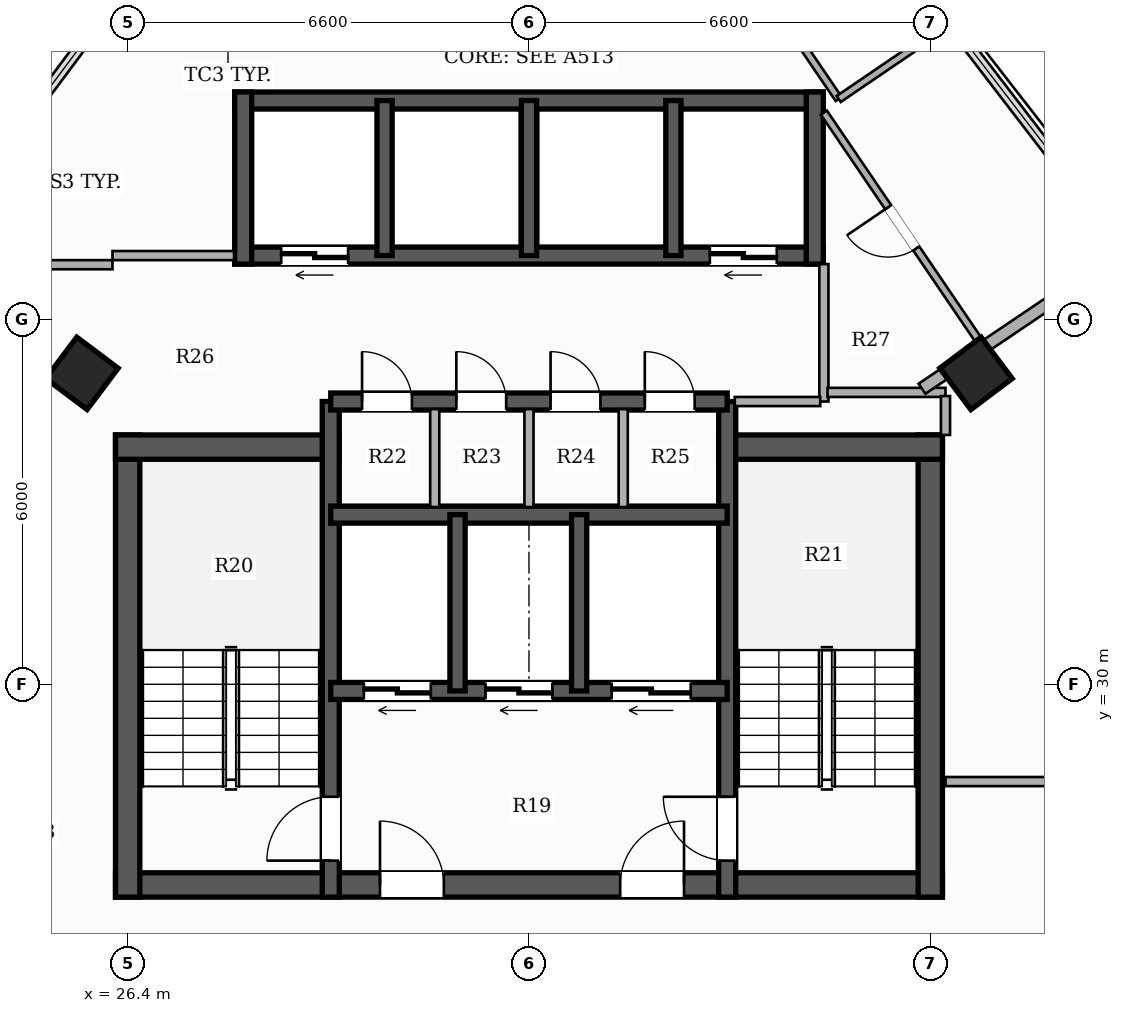
"""IFC4 building model, lengths in metres.
Left out: names, types, materials, properties, quantities, classifications, styles, units other than length and angle.
Written with IfcOpenShell. Run it as: python <this file> out.ifc"""

import sys

from ifc_helpers import new_model, si_unit, direction, frame, frame_2d, origin, origin_2d, place, context, subcontext, project, spatial, rectangle, hollow_rectangle, extrude, element, fill, save


model = new_model("IFC4")
c1 = context("Model", 3, precision=1e-05, world=origin(), true_north=direction((0.0, 1.0)))
c2 = subcontext(c1, "Body", "Model", "MODEL_VIEW")
j1 = project(units=[si_unit("LENGTHUNIT", "METRE"), si_unit("PLANEANGLEUNIT", "RADIAN")], contexts=[c1])
p1 = place(None, origin())
s1 = spatial("IfcSite", under=j1, at=p1, CompositionType="ELEMENT")
p2 = place(p1, origin())
s2 = spatial("IfcBuilding", under=s1, at=p2, CompositionType="ELEMENT")
p3 = place(p2, frame((0.0, 0.0, 160.55)))
s3 = spatial("IfcBuildingStorey", under=s2, at=p3, CompositionType="ELEMENT", Elevation=160.55)
p4 = place(p3, frame((26.2, 26.7, 0.0), z_axis=(0.0, 0.0, 1.0), x_axis=(1.0, 0.0, 0.0)))
e1 = element("IfcWall", 1, at=p4, inside=s3, PredefinedType="SHEAR", context=c2, shape_type="SweptSolid", body=[
    extrude(rectangle(XDim=13.6, YDim=0.4, at=frame_2d((6.8, 0.0))), origin(), (0.0, 0.0, 1.0), 3.3),
])
p5 = place(p4, frame((4.35, 0.0, 0.0)))
e2 = element("IfcOpeningElement", 2, at=p5, cuts=e1, PredefinedType="OPENING", context=c2, shape_type="SweptSolid", body=[
    extrude(rectangle(XDim=1.05, YDim=2.15, at=frame_2d((0.525, 1.075))), frame((0.0, 0.21, 0.0), z_axis=(0.0, -1.0, 0.0), x_axis=(1.0, 0.0, 0.0)), (0.0, 0.0, 1.0), 0.42),
])
p6 = place(p4, frame((8.3, 0.0, 0.0)))
e3 = element("IfcOpeningElement", 3, at=p6, cuts=e1, PredefinedType="OPENING", context=c2, shape_type="SweptSolid", body=[
    extrude(rectangle(XDim=1.05, YDim=2.15, at=frame_2d((0.525, 1.075))), frame((0.0, 0.21, 0.0), z_axis=(0.0, -1.0, 0.0), x_axis=(1.0, 0.0, 0.0)), (0.0, 0.0, 1.0), 0.42),
])
p7 = place(p3, frame((26.4, 26.5, 0.0), z_axis=(0.0, 0.0, 1.0), x_axis=(0.0, 1.0, 0.0)))
e4 = element("IfcWall", 4, at=p7, inside=s3, PredefinedType="SHEAR", context=c2, shape_type="SweptSolid", body=[
    extrude(rectangle(XDim=7.6, YDim=0.4, at=frame_2d((3.8, 0.0))), origin(), (0.0, 0.0, 1.0), 3.3),
])
p8 = place(p3, frame((26.2, 33.9, 0.0), z_axis=(0.0, 0.0, 1.0), x_axis=(1.0, 0.0, 0.0)))
e5 = element("IfcWall", 5, at=p8, inside=s3, PredefinedType="SHEAR", context=c2, shape_type="SweptSolid", body=[
    extrude(rectangle(XDim=3.68, YDim=0.4, at=frame_2d((1.84, 0.0))), origin(), (0.0, 0.0, 1.0), 3.3),
])
p9 = place(p3, frame((39.6, 26.5, 0.0), z_axis=(0.0, 0.0, 1.0), x_axis=(0.0, 1.0, 0.0)))
e6 = element("IfcWall", 6, at=p9, inside=s3, PredefinedType="SHEAR", context=c2, shape_type="SweptSolid", body=[
    extrude(rectangle(XDim=7.6, YDim=0.4, at=frame_2d((3.8, 0.0))), origin(), (0.0, 0.0, 1.0), 3.3),
])
p10 = place(p3, frame((36.12, 33.9, 0.0), z_axis=(0.0, 0.0, 1.0), x_axis=(1.0, 0.0, 0.0)))
e7 = element("IfcWall", 7, at=p10, inside=s3, PredefinedType="SHEAR", context=c2, shape_type="SweptSolid", body=[
    extrude(rectangle(XDim=3.68, YDim=0.4, at=frame_2d((1.84, 0.0))), origin(), (0.0, 0.0, 1.0), 3.3),
])
p11 = place(p3, frame((29.74, 26.5, 0.0), z_axis=(0.0, 0.0, 1.0), x_axis=(0.0, 1.0, 0.0)))
e8 = element("IfcWall", 8, at=p11, inside=s3, PredefinedType="SHEAR", context=c2, shape_type="SweptSolid", body=[
    extrude(rectangle(XDim=8.15, YDim=0.28, at=frame_2d((4.075, 0.0))), origin(), (0.0, 0.0, 1.0), 3.3),
])
p12 = place(p11, frame((0.6, 0.0, 0.0)))
e9 = element("IfcOpeningElement", 9, at=p12, cuts=e8, PredefinedType="OPENING", context=c2, shape_type="SweptSolid", body=[
    extrude(rectangle(XDim=1.05, YDim=2.15, at=frame_2d((0.525, 1.075))), frame((0.0, 0.15, 0.0), z_axis=(0.0, -1.0, 0.0), x_axis=(1.0, 0.0, 0.0)), (0.0, 0.0, 1.0), 0.3),
])
p13 = place(p3, frame((36.26, 26.5, 0.0), z_axis=(0.0, 0.0, 1.0), x_axis=(0.0, 1.0, 0.0)))
e10 = element("IfcWall", 10, at=p13, inside=s3, PredefinedType="SHEAR", context=c2, shape_type="SweptSolid", body=[
    extrude(rectangle(XDim=8.15, YDim=0.28, at=frame_2d((4.075, 0.0))), origin(), (0.0, 0.0, 1.0), 3.3),
])
p14 = place(p13, frame((0.6, 0.0, 0.0)))
e11 = element("IfcOpeningElement", 11, at=p14, cuts=e10, PredefinedType="OPENING", context=c2, shape_type="SweptSolid", body=[
    extrude(rectangle(XDim=1.05, YDim=2.15, at=frame_2d((0.525, 1.075))), frame((0.0, 0.15, 0.0), z_axis=(0.0, -1.0, 0.0), x_axis=(1.0, 0.0, 0.0)), (0.0, 0.0, 1.0), 0.3),
])
p15 = place(p3, frame((36.26, 29.89, 0.0), z_axis=(0.0, 0.0, 1.0), x_axis=(-1.0, 0.0, 0.0)))
e12 = element("IfcWall", 12, at=p15, inside=s3, PredefinedType="SHEAR", context=c2, shape_type="SweptSolid", body=[
    extrude(rectangle(XDim=6.52, YDim=0.28, at=frame_2d((3.26, 0.0))), origin(), (0.0, 0.0, 1.0), 3.3),
])
p16 = place(p15, frame((4.875, 0.0, 0.0)))
e13 = element("IfcOpeningElement", 13, at=p16, cuts=e12, PredefinedType="OPENING", context=c2, shape_type="SweptSolid", body=[
    extrude(rectangle(XDim=1.1, YDim=2.2, at=frame_2d((0.55, 1.1))), frame((0.0, 0.15, 0.0), z_axis=(0.0, -1.0, 0.0), x_axis=(1.0, 0.0, 0.0)), (0.0, 0.0, 1.0), 0.3),
])
p17 = place(p15, frame((2.875, 0.0, 0.0)))
e14 = element("IfcOpeningElement", 14, at=p17, cuts=e12, PredefinedType="OPENING", context=c2, shape_type="SweptSolid", body=[
    extrude(rectangle(XDim=1.1, YDim=2.2, at=frame_2d((0.55, 1.1))), frame((0.0, 0.15, 0.0), z_axis=(0.0, -1.0, 0.0), x_axis=(1.0, 0.0, 0.0)), (0.0, 0.0, 1.0), 0.3),
])
p18 = place(p15, frame((0.6, 0.0, 0.0)))
e15 = element("IfcOpeningElement", 15, at=p18, cuts=e12, PredefinedType="OPENING", context=c2, shape_type="SweptSolid", body=[
    extrude(rectangle(XDim=1.3, YDim=2.2, at=frame_2d((0.65, 1.1))), frame((0.0, 0.15, 0.0), z_axis=(0.0, -1.0, 0.0), x_axis=(1.0, 0.0, 0.0)), (0.0, 0.0, 1.0), 0.3),
])
p19 = place(p3, frame((29.74, 32.79, 0.0), z_axis=(0.0, 0.0, 1.0), x_axis=(1.0, 0.0, 0.0)))
e16 = element("IfcWall", 16, at=p19, inside=s3, PredefinedType="SHEAR", context=c2, shape_type="SweptSolid", body=[
    extrude(rectangle(XDim=6.52, YDim=0.28, at=frame_2d((3.26, 0.0))), origin(), (0.0, 0.0, 1.0), 3.3),
])
for number, where, z_axis, x_axis in (
    (17, (31.825, 29.89, 0.0), (0.0, 0.0, 1.0), (0.0, 1.0, 0.0)),
    (18, (33.825, 29.89, 0.0), (0.0, 0.0, 1.0), (0.0, 1.0, 0.0)),
):
    element("IfcWall", number, at=place(p3, frame(where, z_axis=z_axis, x_axis=x_axis)), inside=s3, PredefinedType="SHEAR", context=c2, shape_type="SweptSolid", body=[
        extrude(rectangle(XDim=2.9, YDim=0.25, at=frame_2d((1.45, 0.0))), origin(), (0.0, 0.0, 1.0), 3.3),
    ])
p20 = place(p3, frame((29.74, 34.65, 0.0), z_axis=(0.0, 0.0, 1.0), x_axis=(1.0, 0.0, 0.0)))
e19 = element("IfcWall", 19, at=p20, inside=s3, PredefinedType="SHEAR", context=c2, shape_type="SweptSolid", body=[
    extrude(rectangle(XDim=6.52, YDim=0.28, at=frame_2d((3.26, 0.0))), origin(), (0.0, 0.0, 1.0), 3.3),
])
p21 = place(p20, frame((0.515, 0.0, 0.0)))
e20 = element("IfcOpeningElement", 20, at=p21, cuts=e19, PredefinedType="OPENING", context=c2, shape_type="SweptSolid", body=[
    extrude(rectangle(XDim=0.82, YDim=2.1, at=frame_2d((0.41, 1.05))), frame((0.0, 0.15, 0.0), z_axis=(0.0, -1.0, 0.0), x_axis=(1.0, 0.0, 0.0)), (0.0, 0.0, 1.0), 0.3),
])
p22 = place(p20, frame((2.065, 0.0, 0.0)))
e21 = element("IfcOpeningElement", 21, at=p22, cuts=e19, PredefinedType="OPENING", context=c2, shape_type="SweptSolid", body=[
    extrude(rectangle(XDim=0.82, YDim=2.1, at=frame_2d((0.41, 1.05))), frame((0.0, 0.15, 0.0), z_axis=(0.0, -1.0, 0.0), x_axis=(1.0, 0.0, 0.0)), (0.0, 0.0, 1.0), 0.3),
])
p23 = place(p20, frame((3.615, 0.0, 0.0)))
e22 = element("IfcOpeningElement", 22, at=p23, cuts=e19, PredefinedType="OPENING", context=c2, shape_type="SweptSolid", body=[
    extrude(rectangle(XDim=0.82, YDim=2.1, at=frame_2d((0.41, 1.05))), frame((0.0, 0.15, 0.0), z_axis=(0.0, -1.0, 0.0), x_axis=(1.0, 0.0, 0.0)), (0.0, 0.0, 1.0), 0.3),
])
p24 = place(p20, frame((5.165, 0.0, 0.0)))
e23 = element("IfcOpeningElement", 23, at=p24, cuts=e19, PredefinedType="OPENING", context=c2, shape_type="SweptSolid", body=[
    extrude(rectangle(XDim=0.82, YDim=2.1, at=frame_2d((0.41, 1.05))), frame((0.0, 0.15, 0.0), z_axis=(0.0, -1.0, 0.0), x_axis=(1.0, 0.0, 0.0)), (0.0, 0.0, 1.0), 0.3),
])
p25 = place(p3, frame((37.84, 37.05, 0.0), z_axis=(0.0, 0.0, 1.0), x_axis=(-1.0, 0.0, 0.0)))
e24 = element("IfcWall", 24, at=p25, inside=s3, PredefinedType="SHEAR", context=c2, shape_type="SweptSolid", body=[
    extrude(rectangle(XDim=9.68, YDim=0.28, at=frame_2d((4.84, 0.0))), origin(), (0.0, 0.0, 1.0), 3.3),
])
p26 = place(p25, frame((7.815, 0.0, 0.0)))
e25 = element("IfcOpeningElement", 25, at=p26, cuts=e24, PredefinedType="OPENING", context=c2, shape_type="SweptSolid", body=[
    extrude(rectangle(XDim=1.1, YDim=2.2, at=frame_2d((0.55, 1.1))), frame((0.0, 0.15, 0.0), z_axis=(0.0, -1.0, 0.0), x_axis=(1.0, 0.0, 0.0)), (0.0, 0.0, 1.0), 0.3),
])
p27 = place(p25, frame((0.765, 0.0, 0.0)))
e26 = element("IfcOpeningElement", 26, at=p27, cuts=e24, PredefinedType="OPENING", context=c2, shape_type="SweptSolid", body=[
    extrude(rectangle(XDim=1.1, YDim=2.2, at=frame_2d((0.55, 1.1))), frame((0.0, 0.15, 0.0), z_axis=(0.0, -1.0, 0.0), x_axis=(1.0, 0.0, 0.0)), (0.0, 0.0, 1.0), 0.3),
])
p28 = place(p3, frame((28.16, 39.6, 0.0), z_axis=(0.0, 0.0, 1.0), x_axis=(1.0, 0.0, 0.0)))
e27 = element("IfcWall", 27, at=p28, inside=s3, PredefinedType="SHEAR", context=c2, shape_type="SweptSolid", body=[
    extrude(rectangle(XDim=9.68, YDim=0.28, at=frame_2d((4.84, 0.0))), origin(), (0.0, 0.0, 1.0), 3.3),
])
for number, where, z_axis, x_axis in (
    (28, (28.3, 36.91, 0.0), (0.0, 0.0, 1.0), (0.0, 1.0, 0.0)),
    (29, (37.7, 36.91, 0.0), (0.0, 0.0, 1.0), (0.0, 1.0, 0.0)),
):
    element("IfcWall", number, at=place(p3, frame(where, z_axis=z_axis, x_axis=x_axis)), inside=s3, PredefinedType="SHEAR", context=c2, shape_type="SweptSolid", body=[
        extrude(rectangle(XDim=2.83, YDim=0.28, at=frame_2d((1.415, 0.0))), origin(), (0.0, 0.0, 1.0), 3.3),
    ])
for number, where, z_axis, x_axis in (
    (30, (30.625, 37.05, 0.0), (0.0, 0.0, 1.0), (0.0, 1.0, 0.0)),
    (31, (33.0, 37.05, 0.0), (0.0, 0.0, 1.0), (0.0, 1.0, 0.0)),
    (32, (35.375, 37.05, 0.0), (0.0, 0.0, 1.0), (0.0, 1.0, 0.0)),
):
    element("IfcWall", number, at=place(p3, frame(where, z_axis=z_axis, x_axis=x_axis)), inside=s3, PredefinedType="SHEAR", context=c2, shape_type="SweptSolid", body=[
        extrude(rectangle(XDim=2.55, YDim=0.25, at=frame_2d((1.275, 0.0))), origin(), (0.0, 0.0, 1.0), 3.3),
    ])
for number, where, z_axis, x_axis in (
    (33, (25.648, 35.113, 0.0), (0.0, 0.0, 1.0), (0.6, 0.8, 0.0)),
    (34, (40.352, 35.113, 0.0), (0.0, 0.0, 1.0), (-0.6, 0.8, 0.0)),
):
    element("IfcColumn", number, at=place(p3, frame(where, z_axis=z_axis, x_axis=x_axis)), inside=s3, PredefinedType="COLUMN", context=c2, shape_type="SweptSolid", body=[
        extrude(hollow_rectangle(XDim=0.85, YDim=0.85, WallThickness=0.028, at=origin_2d()), origin(), (0.0, 0.0, 1.0), 3.3),
    ])
p29 = place(p3, frame((37.85, 34.65, 0.0), z_axis=(0.0, 0.0, 1.0), x_axis=(0.0, 1.0, 0.0)))
e35 = element("IfcWall", 35, at=p29, inside=s3, PredefinedType="PARTITIONING", context=c2, shape_type="SweptSolid", body=[
    extrude(rectangle(XDim=2.26, YDim=0.15, at=frame_2d((1.13, 0.0))), origin(), (0.0, 0.0, 1.0), 3.06),
])
p30 = place(p3, frame((36.385, 34.65, 0.0), z_axis=(0.0, 0.0, 1.0), x_axis=(1.0, 0.0, 0.0)))
e36 = element("IfcWall", 36, at=p30, inside=s3, PredefinedType="PARTITIONING", context=c2, shape_type="SweptSolid", body=[
    extrude(rectangle(XDim=1.405, YDim=0.15, at=frame_2d((0.703, 0.0))), origin(), (0.0, 0.0, 1.0), 2.425),
])
for number, where, z_axis, x_axis in (
    (37, (31.45, 32.915, 0.0), (0.0, 0.0, 1.0), (0.0, 1.0, 0.0)),
    (38, (33.0, 32.915, 0.0), (0.0, 0.0, 1.0), (0.0, 1.0, 0.0)),
    (39, (34.55, 32.915, 0.0), (0.0, 0.0, 1.0), (0.0, 1.0, 0.0)),
):
    element("IfcWall", number, at=place(p3, frame(where, z_axis=z_axis, x_axis=x_axis)), inside=s3, PredefinedType="PARTITIONING", context=c2, shape_type="SweptSolid", body=[
        extrude(rectangle(XDim=1.61, YDim=0.15, at=frame_2d((0.805, 0.0))), origin(), (0.0, 0.0, 1.0), 3.06),
    ])
p31 = place(p3, frame((23.56, 36.9, 0.0), z_axis=(0.0, 0.0, 1.0), x_axis=(1.0, 0.0, 0.0)))
e40 = element("IfcWall", 40, at=p31, inside=s3, PredefinedType="PARTITIONING", context=c2, shape_type="SweptSolid", body=[
    extrude(rectangle(XDim=2.59, YDim=0.15, at=frame_2d((1.295, 0.0))), origin(), (0.0, 0.0, 1.0), 2.413),
])
p32 = place(p3, frame((39.85, 28.4, 0.0), z_axis=(0.0, 0.0, 1.0), x_axis=(1.0, 0.0, 0.0)))
e41 = element("IfcWall", 41, at=p32, inside=s3, PredefinedType="PARTITIONING", context=c2, shape_type="SweptSolid", body=[
    extrude(rectangle(XDim=2.5, YDim=0.15, at=frame_2d((1.25, 0.0))), origin(), (0.0, 0.0, 1.0), 2.721),
])
p33 = place(p3, frame((26.15, 37.05, 0.0), z_axis=(0.0, 0.0, 1.0), x_axis=(1.0, 0.0, 0.0)))
e42 = element("IfcWall", 42, at=p33, inside=s3, PredefinedType="PARTITIONING", context=c2, shape_type="SweptSolid", body=[
    extrude(rectangle(XDim=2.0, YDim=0.15, at=frame_2d((1.0, 0.0))), origin(), (0.0, 0.0, 1.0), 2.413),
])
p34 = place(p3, frame((37.91, 34.8, 0.0), z_axis=(0.0, 0.0, 1.0), x_axis=(1.0, 0.0, 0.0)))
e43 = element("IfcWall", 43, at=p34, inside=s3, PredefinedType="PARTITIONING", context=c2, shape_type="SweptSolid", body=[
    extrude(rectangle(XDim=1.94, YDim=0.15, at=frame_2d((0.97, 0.0))), origin(), (0.0, 0.0, 1.0), 2.721),
])
p35 = place(p3, frame((39.85, 34.74, 0.0), z_axis=(0.0, 0.0, 1.0), x_axis=(0.0, -1.0, 0.0)))
e44 = element("IfcWall", 44, at=p35, inside=s3, PredefinedType="PARTITIONING", context=c2, shape_type="SweptSolid", body=[
    extrude(rectangle(XDim=0.64, YDim=0.15, at=frame_2d((0.32, 0.0))), origin(), (0.0, 0.0, 1.0), 2.721),
])
p36 = place(p3, frame((39.464, 34.86, 0.0), z_axis=(0.0, 0.0, 1.0), x_axis=(0.828976210701, 0.559283865395, 0.0)))
e45 = element("IfcWall", 45, at=p36, inside=s3, PredefinedType="PARTITIONING", context=c2, shape_type="SweptSolid", body=[
    extrude(rectangle(XDim=4.171, YDim=0.2, at=frame_2d((2.086, 0.0))), origin(), (0.0, 0.0, 1.0), 2.413),
])
p37 = place(p3, frame((40.427, 35.612, 0.0), z_axis=(0.0, 0.0, 1.0), x_axis=(-0.562385802303, 0.826874965982, 0.0)))
e46 = element("IfcWall", 46, at=p37, inside=s3, PredefinedType="PARTITIONING", context=c2, shape_type="SweptSolid", body=[
    extrude(rectangle(XDim=4.582, YDim=0.12, at=frame_2d((2.291, 0.0))), origin(), (0.0, 0.0, 1.0), 2.413),
])
p38 = place(p37, frame((1.881, 0.0, 0.0)))
e47 = element("IfcOpeningElement", 47, at=p38, cuts=e46, PredefinedType="OPENING", context=c2, shape_type="SweptSolid", body=[
    extrude(rectangle(XDim=0.82, YDim=2.1, at=frame_2d((0.41, 1.05))), frame((0.0, 0.07, 0.0), z_axis=(0.0, -1.0, 0.0), x_axis=(1.0, 0.0, 0.0)), (0.0, 0.0, 1.0), 0.14),
])
p39 = place(p3, frame((32.473, 47.892, 0.0), z_axis=(0.0, 0.0, 1.0), x_axis=(0.562273950157, -0.826951029369, 0.0)))
e48 = element("IfcWall", 48, at=p39, inside=s3, PredefinedType="PARTITIONING", context=c2, shape_type="SweptSolid", body=[
    extrude(rectangle(XDim=9.997, YDim=0.12, at=frame_2d((4.999, 0.0))), origin(), (0.0, 0.0, 1.0), 2.413),
])
p40 = place(p39, frame((4.558, 0.0, 0.0)))
e49 = element("IfcOpeningElement", 49, at=p40, cuts=e48, PredefinedType="OPENING", context=c2, shape_type="SweptSolid", body=[
    extrude(rectangle(XDim=0.88, YDim=2.1, at=frame_2d((0.44, 1.05))), frame((0.0, 0.07, 0.0), z_axis=(0.0, -1.0, 0.0), x_axis=(1.0, 0.0, 0.0)), (0.0, 0.0, 1.0), 0.14),
])
p41 = place(p3, frame((38.094, 39.625, 0.0), z_axis=(0.0, 0.0, 1.0), x_axis=(0.826798473187, 0.562498253096, 0.0)))
e50 = element("IfcWall", 50, at=p41, inside=s3, PredefinedType="PARTITIONING", context=c2, shape_type="SweptSolid", body=[
    extrude(rectangle(XDim=2.377, YDim=0.12, at=frame_2d((1.188, 0.0))), origin(), (0.0, 0.0, 1.0), 2.413),
])
p42 = place(p12, origin())
e51 = element("IfcDoor", 51, at=p42, inside=s3, OperationType="SINGLE_SWING_LEFT", PredefinedType="DOOR", context=c2, shape_type="SweptSolid", body=[
    extrude(rectangle(XDim=1.05, YDim=2.15, at=frame_2d((0.525, 1.075))), frame((0.0, 0.025, 0.0), z_axis=(0.0, -1.0, 0.0), x_axis=(1.0, 0.0, 0.0)), (0.0, 0.0, 1.0), 0.05),
])
fill(e9, e51)
p43 = place(p14, origin())
e52 = element("IfcDoor", 52, at=p43, inside=s3, OperationType="SINGLE_SWING_RIGHT", PredefinedType="DOOR", context=c2, shape_type="SweptSolid", body=[
    extrude(rectangle(XDim=1.05, YDim=2.15, at=frame_2d((0.525, 1.075))), frame((0.0, 0.025, 0.0), z_axis=(0.0, -1.0, 0.0), x_axis=(1.0, 0.0, 0.0)), (0.0, 0.0, 1.0), 0.05),
])
fill(e11, e52)
p44 = place(p5, origin())
e53 = element("IfcDoor", 53, at=p44, inside=s3, OperationType="SINGLE_SWING_LEFT", PredefinedType="DOOR", context=c2, shape_type="SweptSolid", body=[
    extrude(rectangle(XDim=1.05, YDim=2.15, at=frame_2d((0.525, 1.075))), frame((0.0, 0.025, 0.0), z_axis=(0.0, -1.0, 0.0), x_axis=(1.0, 0.0, 0.0)), (0.0, 0.0, 1.0), 0.05),
])
fill(e2, e53)
p45 = place(p6, origin())
e54 = element("IfcDoor", 54, at=p45, inside=s3, OperationType="SINGLE_SWING_RIGHT", PredefinedType="DOOR", context=c2, shape_type="SweptSolid", body=[
    extrude(rectangle(XDim=1.05, YDim=2.15, at=frame_2d((0.525, 1.075))), frame((0.0, 0.025, 0.0), z_axis=(0.0, -1.0, 0.0), x_axis=(1.0, 0.0, 0.0)), (0.0, 0.0, 1.0), 0.05),
])
fill(e3, e54)
p46 = place(p16, origin())
e55 = element("IfcDoor", 55, at=p46, inside=s3, OperationType="DOUBLE_DOOR_SLIDING", PredefinedType="DOOR", context=c2, shape_type="SweptSolid", body=[
    extrude(rectangle(XDim=1.1, YDim=2.2, at=frame_2d((0.55, 1.1))), frame((0.0, 0.025, 0.0), z_axis=(0.0, -1.0, 0.0), x_axis=(1.0, 0.0, 0.0)), (0.0, 0.0, 1.0), 0.05),
])
fill(e13, e55)
p47 = place(p17, origin())
e56 = element("IfcDoor", 56, at=p47, inside=s3, OperationType="DOUBLE_DOOR_SLIDING", PredefinedType="DOOR", context=c2, shape_type="SweptSolid", body=[
    extrude(rectangle(XDim=1.1, YDim=2.2, at=frame_2d((0.55, 1.1))), frame((0.0, 0.025, 0.0), z_axis=(0.0, -1.0, 0.0), x_axis=(1.0, 0.0, 0.0)), (0.0, 0.0, 1.0), 0.05),
])
fill(e14, e56)
p48 = place(p18, origin())
e57 = element("IfcDoor", 57, at=p48, inside=s3, OperationType="DOUBLE_DOOR_SLIDING", PredefinedType="DOOR", context=c2, shape_type="SweptSolid", body=[
    extrude(rectangle(XDim=1.3, YDim=2.2, at=frame_2d((0.65, 1.1))), frame((0.0, 0.025, 0.0), z_axis=(0.0, -1.0, 0.0), x_axis=(1.0, 0.0, 0.0)), (0.0, 0.0, 1.0), 0.05),
])
fill(e15, e57)
p49 = place(p26, origin())
e58 = element("IfcDoor", 58, at=p49, inside=s3, OperationType="DOUBLE_DOOR_SLIDING", PredefinedType="DOOR", context=c2, shape_type="SweptSolid", body=[
    extrude(rectangle(XDim=1.1, YDim=2.2, at=frame_2d((0.55, 1.1))), frame((0.0, 0.025, 0.0), z_axis=(0.0, -1.0, 0.0), x_axis=(1.0, 0.0, 0.0)), (0.0, 0.0, 1.0), 0.05),
])
fill(e25, e58)
p50 = place(p27, origin())
e59 = element("IfcDoor", 59, at=p50, inside=s3, OperationType="DOUBLE_DOOR_SLIDING", PredefinedType="DOOR", context=c2, shape_type="SweptSolid", body=[
    extrude(rectangle(XDim=1.1, YDim=2.2, at=frame_2d((0.55, 1.1))), frame((0.0, 0.025, 0.0), z_axis=(0.0, -1.0, 0.0), x_axis=(1.0, 0.0, 0.0)), (0.0, 0.0, 1.0), 0.05),
])
fill(e26, e59)
p51 = place(p21, origin())
e60 = element("IfcDoor", 60, at=p51, inside=s3, OperationType="SINGLE_SWING_LEFT", PredefinedType="DOOR", context=c2, shape_type="SweptSolid", body=[
    extrude(rectangle(XDim=0.82, YDim=2.1, at=frame_2d((0.41, 1.05))), frame((0.0, 0.025, 0.0), z_axis=(0.0, -1.0, 0.0), x_axis=(1.0, 0.0, 0.0)), (0.0, 0.0, 1.0), 0.05),
])
fill(e20, e60)
p52 = place(p22, origin())
e61 = element("IfcDoor", 61, at=p52, inside=s3, OperationType="SINGLE_SWING_LEFT", PredefinedType="DOOR", context=c2, shape_type="SweptSolid", body=[
    extrude(rectangle(XDim=0.82, YDim=2.1, at=frame_2d((0.41, 1.05))), frame((0.0, 0.025, 0.0), z_axis=(0.0, -1.0, 0.0), x_axis=(1.0, 0.0, 0.0)), (0.0, 0.0, 1.0), 0.05),
])
fill(e21, e61)
p53 = place(p23, origin())
e62 = element("IfcDoor", 62, at=p53, inside=s3, OperationType="SINGLE_SWING_LEFT", PredefinedType="DOOR", context=c2, shape_type="SweptSolid", body=[
    extrude(rectangle(XDim=0.82, YDim=2.1, at=frame_2d((0.41, 1.05))), frame((0.0, 0.025, 0.0), z_axis=(0.0, -1.0, 0.0), x_axis=(1.0, 0.0, 0.0)), (0.0, 0.0, 1.0), 0.05),
])
fill(e22, e62)
p54 = place(p24, origin())
e63 = element("IfcDoor", 63, at=p54, inside=s3, OperationType="SINGLE_SWING_LEFT", PredefinedType="DOOR", context=c2, shape_type="SweptSolid", body=[
    extrude(rectangle(XDim=0.82, YDim=2.1, at=frame_2d((0.41, 1.05))), frame((0.0, 0.025, 0.0), z_axis=(0.0, -1.0, 0.0), x_axis=(1.0, 0.0, 0.0)), (0.0, 0.0, 1.0), 0.05),
])
fill(e23, e63)
p55 = place(p38, origin())
e64 = element("IfcDoor", 64, at=p55, inside=s3, OperationType="SINGLE_SWING_RIGHT", PredefinedType="DOOR", context=c2, shape_type="SweptSolid", body=[
    extrude(rectangle(XDim=0.82, YDim=2.1, at=frame_2d((0.41, 1.05))), frame((0.0, 0.025, 0.0), z_axis=(0.0, -1.0, 0.0), x_axis=(1.0, 0.0, 0.0)), (0.0, 0.0, 1.0), 0.05),
])
fill(e47, e64)
save(model, sys.argv[1])
